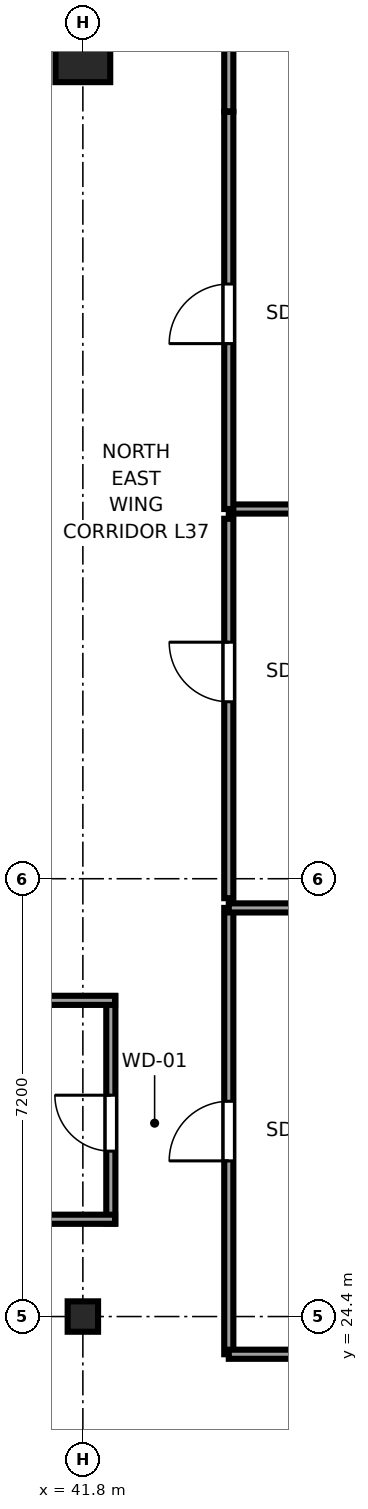
"""IFC4 building model, lengths in metres.
Left out: names, types, materials, properties, quantities, classifications, styles, units other than length and angle.
Written with IfcOpenShell. Run it as: python <this file> out.ifc"""

import sys

from ifc_helpers import new_model, si_unit, direction, frame, frame_2d, origin, origin_2d, place, context, subcontext, project, spatial, rectangle, i_section, extrude, source, transform, mapped, element, fill, save


model = new_model("IFC4")
c1 = context("Model", 3, precision=1e-05, world=origin(), true_north=direction((0.0, 1.0)))
c2 = subcontext(c1, "Body", "Model", "MODEL_VIEW")
j1 = project(units=[si_unit("LENGTHUNIT", "METRE"), si_unit("PLANEANGLEUNIT", "RADIAN")], contexts=[c1])
p1 = place(None, origin())
s1 = spatial("IfcSite", under=j1, at=p1, CompositionType="ELEMENT")
p2 = place(p1, origin())
s2 = spatial("IfcBuilding", under=s1, at=p2, CompositionType="ELEMENT")
p3 = place(p2, frame((0.0, 0.0, 143.5)))
s3 = spatial("IfcBuildingStorey", under=s2, at=p3, CompositionType="ELEMENT", Elevation=143.5)
m1 = source(origin(), c2, "Body", "SweptSolid", [
    extrude(i_section(OverallWidth=0.5, OverallDepth=0.5, WebThickness=0.022, FlangeThickness=0.034, at=origin_2d()), origin(), (0.0, 0.0, 1.0), 3.55),
])
p4 = place(p3, frame((41.8, 24.4, 0.0), z_axis=(0.0, 0.0, 1.0), x_axis=(1.0, 0.0, 0.0)))
e1 = element("IfcColumn", 1, at=p4, inside=s3, PredefinedType="COLUMN", context=c2, shape_type="MappedRepresentation", body=[
    mapped(m1, transform((0.0, 0.0, 0.0), x_axis=(1.0, 0.0, 0.0), y_axis=(0.0, 1.0, 0.0), z_axis=(0.0, 0.0, 1.0), scale=1.0)),
])
m2 = source(origin(), c2, "Body", "SweptSolid", [
    extrude(rectangle(XDim=0.9, YDim=0.9, at=origin_2d()), origin(), (0.0, 0.0, 1.0), 3.55),
])
p5 = place(p3, frame((41.8, 45.15, 0.0), z_axis=(0.0, 0.0, 1.0), x_axis=(1.0, 0.0, 0.0)))
e2 = element("IfcColumn", 2, at=p5, inside=s3, PredefinedType="COLUMN", context=c2, shape_type="MappedRepresentation", body=[
    mapped(m2, transform((0.0, 0.0, 0.0), x_axis=(1.0, 0.0, 0.0), y_axis=(0.0, 1.0, 0.0), z_axis=(0.0, 0.0, 1.0), scale=1.0)),
])
p6 = place(p3, frame((44.2, 37.68, 0.0), z_axis=(0.0, 0.0, 1.0), x_axis=(1.0, 0.0, 0.0)))
e3 = element("IfcWall", 3, at=p6, inside=s3, PredefinedType="PARTITIONING", context=c2, shape_type="SweptSolid", body=[
    extrude(rectangle(XDim=12.395, YDim=0.15, at=frame_2d((6.198, 0.0))), origin(), (0.0, 0.0, 1.0), 3.29),
])
p7 = place(p3, frame((44.2, 23.78, 0.0), z_axis=(0.0, 0.0, 1.0), x_axis=(0.0, 1.0, 0.0)))
e4 = element("IfcWall", 4, at=p7, inside=s3, PredefinedType="PARTITIONING", context=c2, shape_type="SweptSolid", body=[
    extrude(rectangle(XDim=7.34, YDim=0.15, at=frame_2d((3.67, 0.0))), origin(), (0.0, 0.0, 1.0), 3.29),
])
p8 = place(p7, frame((3.18, 0.0, 0.0)))
e5 = element("IfcOpeningElement", 5, at=p8, cuts=e4, PredefinedType="OPENING", context=c2, shape_type="SweptSolid", body=[
    extrude(rectangle(XDim=0.98, YDim=2.12, at=frame_2d((0.49, 1.06))), frame((0.0, 0.085, 0.0), z_axis=(0.0, -1.0, 0.0), x_axis=(1.0, 0.0, 0.0)), (0.0, 0.0, 1.0), 0.17),
])
p9 = place(p3, frame((44.2, 23.78, 0.0), z_axis=(0.0, 0.0, 1.0), x_axis=(1.0, 0.0, 0.0)))
e6 = element("IfcWall", 6, at=p9, inside=s3, PredefinedType="PARTITIONING", context=c2, shape_type="SweptSolid", body=[
    extrude(rectangle(XDim=12.395, YDim=0.15, at=frame_2d((6.198, 0.0))), origin(), (0.0, 0.0, 1.0), 3.29),
])
p10 = place(p3, frame((44.2, 31.12, 0.0), z_axis=(0.0, 0.0, 1.0), x_axis=(1.0, 0.0, 0.0)))
e7 = element("IfcWall", 7, at=p10, inside=s3, PredefinedType="PARTITIONING", context=c2, shape_type="SweptSolid", body=[
    extrude(rectangle(XDim=10.03, YDim=0.15, at=frame_2d((5.015, 0.0))), origin(), (0.0, 0.0, 1.0), 3.29),
])
p11 = place(p3, frame((44.2, 31.28, 0.0), z_axis=(0.0, 0.0, 1.0), x_axis=(0.0, 1.0, 0.0)))
e8 = element("IfcWall", 8, at=p11, inside=s3, PredefinedType="PARTITIONING", context=c2, shape_type="SweptSolid", body=[
    extrude(rectangle(XDim=6.24, YDim=0.15, at=frame_2d((3.12, 0.0))), origin(), (0.0, 0.0, 1.0), 3.29),
])
p12 = place(p11, frame((3.23, 0.0, 0.0)))
e9 = element("IfcOpeningElement", 9, at=p12, cuts=e8, PredefinedType="OPENING", context=c2, shape_type="SweptSolid", body=[
    extrude(rectangle(XDim=0.98, YDim=2.12, at=frame_2d((0.49, 1.06))), frame((0.0, 0.085, 0.0), z_axis=(0.0, -1.0, 0.0), x_axis=(1.0, 0.0, 0.0)), (0.0, 0.0, 1.0), 0.17),
])
p13 = place(p3, frame((44.2, 37.68, 0.0), z_axis=(0.0, 0.0, 1.0), x_axis=(0.0, 1.0, 0.0)))
e10 = element("IfcWall", 10, at=p13, inside=s3, PredefinedType="PARTITIONING", context=c2, shape_type="SweptSolid", body=[
    extrude(rectangle(XDim=6.53, YDim=0.15, at=frame_2d((3.265, 0.0))), origin(), (0.0, 0.0, 1.0), 3.29),
])
p14 = place(p13, frame((2.72, 0.0, 0.0)))
e11 = element("IfcOpeningElement", 11, at=p14, cuts=e10, PredefinedType="OPENING", context=c2, shape_type="SweptSolid", body=[
    extrude(rectangle(XDim=0.98, YDim=2.12, at=frame_2d((0.49, 1.06))), frame((0.0, 0.085, 0.0), z_axis=(0.0, -1.0, 0.0), x_axis=(1.0, 0.0, 0.0)), (0.0, 0.0, 1.0), 0.17),
])
p15 = place(p3, frame((44.2, 44.22, 0.0), z_axis=(0.0, 0.0, 1.0), x_axis=(0.0, 1.0, 0.0)))
e12 = element("IfcWall", 12, at=p15, inside=s3, PredefinedType="PARTITIONING", context=c2, shape_type="SweptSolid", body=[
    extrude(rectangle(XDim=1.375, YDim=0.15, at=frame_2d((0.688, 0.0))), origin(), (0.0, 0.0, 1.0), 3.29),
])
p16 = place(p3, frame((42.26, 25.93, 0.0), z_axis=(0.0, 0.0, 1.0), x_axis=(0.0, 1.0, 0.0)))
e13 = element("IfcWall", 13, at=p16, inside=s3, PredefinedType="PARTITIONING", context=c2, shape_type="SweptSolid", body=[
    extrude(rectangle(XDim=3.74, YDim=0.15, at=frame_2d((1.87, 0.0))), origin(), (0.0, 0.0, 1.0), 3.29),
])
p17 = place(p16, frame((1.19, 0.0, 0.0)))
e14 = element("IfcOpeningElement", 14, at=p17, cuts=e13, PredefinedType="OPENING", context=c2, shape_type="SweptSolid", body=[
    extrude(rectangle(XDim=0.92, YDim=2.01, at=frame_2d((0.46, 1.005))), frame((0.0, 0.085, 0.0), z_axis=(0.0, -1.0, 0.0), x_axis=(1.0, 0.0, 0.0)), (0.0, 0.0, 1.0), 0.17),
])
for number, where, z_axis, x_axis in (
    (15, (37.93, 26.0, 0.0), (0.0, 0.0, 1.0), (1.0, 0.0, 0.0)),
    (16, (37.93, 29.6, 0.0), (0.0, 0.0, 1.0), (1.0, 0.0, 0.0)),
):
    element("IfcWall", number, at=place(p3, frame(where, z_axis=z_axis, x_axis=x_axis)), inside=s3, PredefinedType="PARTITIONING", context=c2, shape_type="SweptSolid", body=[
        extrude(rectangle(XDim=4.4, YDim=0.15, at=frame_2d((2.2, 0.0))), origin(), (0.0, 0.0, 1.0), 3.29),
    ])
m3 = source(origin(), c2, "Body", "SweptSolid", [
    extrude(rectangle(XDim=0.98, YDim=2.12, at=frame_2d((0.49, 1.06))), frame((0.0, 0.025, 0.0), z_axis=(0.0, -1.0, 0.0), x_axis=(1.0, 0.0, 0.0)), (0.0, 0.0, 1.0), 0.05),
])
p18 = place(p8, origin())
e17 = element("IfcDoor", 17, at=p18, inside=s3, OperationType="SINGLE_SWING_LEFT", PredefinedType="DOOR", context=c2, shape_type="MappedRepresentation", body=[
    mapped(m3, transform((0.0, 0.0, 0.0), x_axis=(1.0, 0.0, 0.0), y_axis=(0.0, 1.0, 0.0), z_axis=(0.0, 0.0, 1.0), scale=1.0)),
])
fill(e5, e17)
p19 = place(p12, origin())
e18 = element("IfcDoor", 18, at=p19, inside=s3, OperationType="SINGLE_SWING_RIGHT", PredefinedType="DOOR", context=c2, shape_type="MappedRepresentation", body=[
    mapped(m3, transform((0.0, 0.0, 0.0), x_axis=(1.0, 0.0, 0.0), y_axis=(0.0, 1.0, 0.0), z_axis=(0.0, 0.0, 1.0), scale=1.0)),
])
fill(e9, e18)
p20 = place(p14, origin())
e19 = element("IfcDoor", 19, at=p20, inside=s3, OperationType="SINGLE_SWING_LEFT", PredefinedType="DOOR", context=c2, shape_type="MappedRepresentation", body=[
    mapped(m3, transform((0.0, 0.0, 0.0), x_axis=(1.0, 0.0, 0.0), y_axis=(0.0, 1.0, 0.0), z_axis=(0.0, 0.0, 1.0), scale=1.0)),
])
fill(e11, e19)
m4 = source(origin(), c2, "Body", "SweptSolid", [
    extrude(rectangle(XDim=0.92, YDim=2.01, at=frame_2d((0.46, 1.005))), frame((0.0, 0.025, 0.0), z_axis=(0.0, -1.0, 0.0), x_axis=(1.0, 0.0, 0.0)), (0.0, 0.0, 1.0), 0.05),
])
p21 = place(p17, origin())
e20 = element("IfcDoor", 20, at=p21, inside=s3, OperationType="SINGLE_SWING_RIGHT", PredefinedType="DOOR", context=c2, shape_type="MappedRepresentation", body=[
    mapped(m4, transform((0.0, 0.0, 0.0), x_axis=(1.0, 0.0, 0.0), y_axis=(0.0, 1.0, 0.0), z_axis=(0.0, 0.0, 1.0), scale=1.0)),
])
fill(e14, e20)
save(model, sys.argv[1])
